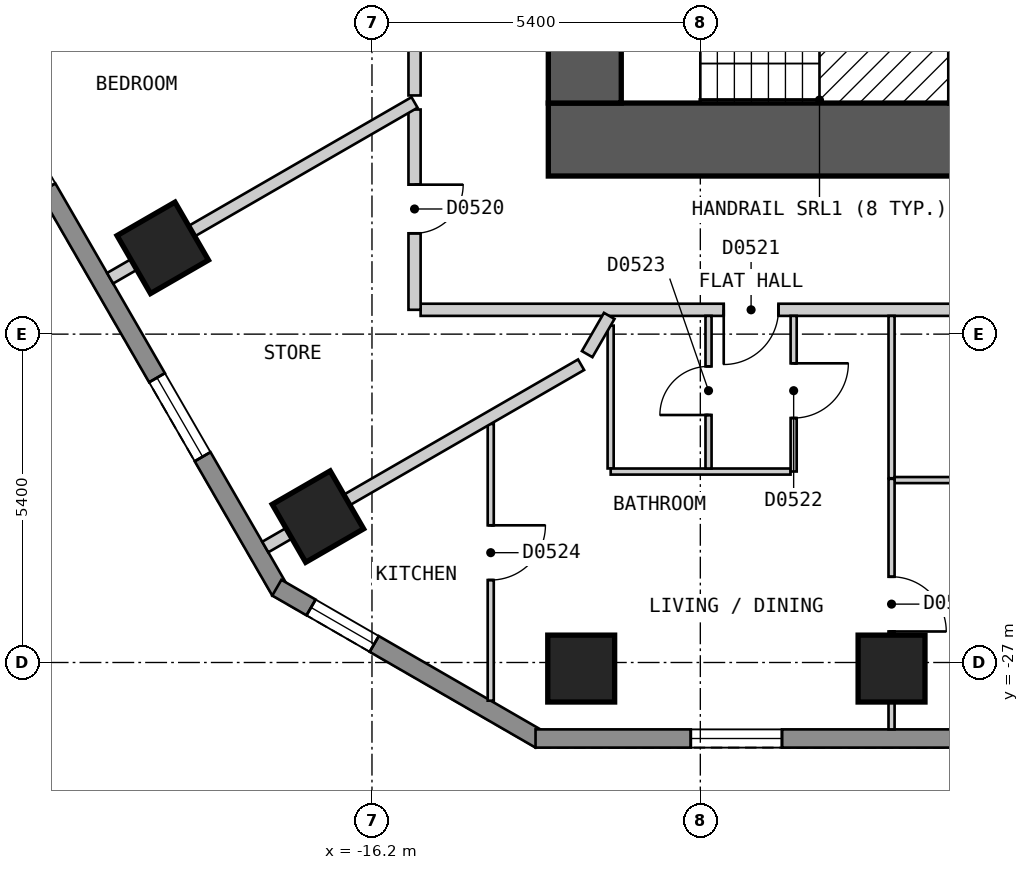
"""IFC4 building model, lengths in metres.
Left out: names, types, materials, properties, quantities, classifications, styles, units other than length and angle.
Written with IfcOpenShell. Run it as: python <this file> out.ifc"""

import sys

from ifc_helpers import new_model, si_unit, direction, frame, frame_2d, origin, origin_2d, place, context, subcontext, project, spatial, polyline, rectangle, outline, extrude, element, fill, save


model = new_model("IFC4")
c1 = context("Model", 3, precision=1e-05, world=origin(), true_north=direction((0.0, 1.0)))
c2 = subcontext(c1, "Body", "Model", "MODEL_VIEW")
j1 = project(units=[si_unit("LENGTHUNIT", "METRE"), si_unit("PLANEANGLEUNIT", "RADIAN")], contexts=[c1])
p1 = place(None, origin())
s1 = spatial("IfcSite", under=j1, at=p1, CompositionType="ELEMENT")
p2 = place(p1, origin())
s2 = spatial("IfcBuilding", under=s1, at=p2, CompositionType="ELEMENT")
p3 = place(p2, frame((0.0, 0.0, 50.4)))
s3 = spatial("IfcBuildingStorey", under=s2, at=p3, CompositionType="ELEMENT", Elevation=50.4)
for number, where, z_axis, x_axis in (
    (1, (-19.641, -20.181, 0.0), (0.0, 0.0, 1.0), (0.5, -0.866, 0.0)),
    (2, (-17.089, -24.601, 0.0), (0.0, 0.0, 1.0), (0.5, -0.866, 0.0)),
    (3, (-12.759, -27.1, 0.0), (0.0, 0.0, 1.0), (1.0, 0.0, 0.0)),
    (4, (-7.655, -27.1, 0.0), (0.0, 0.0, 1.0), (1.0, 0.0, 0.0)),
):
    element("IfcColumn", number, at=place(p3, frame(where, z_axis=z_axis, x_axis=x_axis)), inside=s3, PredefinedType="COLUMN", context=c2, shape_type="SweptSolid", body=[
        extrude(rectangle(XDim=1.1, YDim=1.1, at=origin_2d()), origin(), (0.0, 0.0, 1.0), 3.0),
    ])
p4 = place(p3, frame((-13.3, -18.4, 0.0), z_axis=(0.0, 0.0, 1.0), x_axis=(1.0, 0.0, 0.0)))
e5 = element("IfcWall", 5, at=p4, inside=s3, PredefinedType="SHEAR", context=c2, shape_type="SweptSolid", body=[
    extrude(rectangle(XDim=26.6, YDim=1.2, at=frame_2d((13.3, 0.0))), origin(), (0.0, 0.0, 1.0), 2.7),
])
p5 = place(p3, frame((-12.7, -17.8, 0.0), z_axis=(0.0, 0.0, 1.0), x_axis=(0.0, 1.0, 0.0)))
e6 = element("IfcWall", 6, at=p5, inside=s3, PredefinedType="SHEAR", context=c2, shape_type="SweptSolid", body=[
    extrude(rectangle(XDim=11.6, YDim=1.2, at=frame_2d((5.8, 0.0))), origin(), (0.0, 0.0, 1.0), 2.7),
])
p6 = place(p5, frame((3.6, 0.0, 0.0)))
e7 = element("IfcOpeningElement", 7, at=p6, cuts=e6, PredefinedType="OPENING", context=c2, shape_type="SweptSolid", body=[
    extrude(rectangle(XDim=1.2, YDim=2.1, at=frame_2d((0.6, 1.05))), frame((0.0, 0.61, 0.0), z_axis=(0.0, -1.0, 0.0), x_axis=(1.0, 0.0, 0.0)), (0.0, 0.0, 1.0), 1.22),
])
p7 = place(p3, frame((-31.22, -2.425, 0.0), z_axis=(0.0, 0.0, 1.0), x_axis=(0.500001938803, -0.866024284413, 0.0)))
e8 = element("IfcWall", 8, at=p7, inside=s3, PredefinedType="SOLIDWALL", context=c2, shape_type="SweptSolid", body=[
    extrude(outline(polyline([(0.0, -0.15), (27.02, -0.15), (26.94, 0.15), (0.08, 0.15), (0.0, -0.15)])), origin(), (0.0, 0.0, 1.0), 2.7),
])
p8 = place(p7, frame((2.553, 0.0, 0.15)))
e9 = element("IfcOpeningElement", 9, at=p8, cuts=e8, PredefinedType="OPENING", context=c2, shape_type="SweptSolid", body=[
    extrude(rectangle(XDim=1.5, YDim=2.1, at=frame_2d((0.75, 1.05))), frame((0.0, 0.16, 0.0), z_axis=(0.0, -1.0, 0.0), x_axis=(1.0, 0.0, 0.0)), (0.0, 0.0, 1.0), 0.32),
])
p9 = place(p7, frame((7.657, 0.0, 0.15)))
e10 = element("IfcOpeningElement", 10, at=p9, cuts=e8, PredefinedType="OPENING", context=c2, shape_type="SweptSolid", body=[
    extrude(rectangle(XDim=1.5, YDim=2.1, at=frame_2d((0.75, 1.05))), frame((0.0, 0.16, 0.0), z_axis=(0.0, -1.0, 0.0), x_axis=(1.0, 0.0, 0.0)), (0.0, 0.0, 1.0), 0.32),
])
p10 = place(p7, frame((12.761, 0.0, 0.15)))
e11 = element("IfcOpeningElement", 11, at=p10, cuts=e8, PredefinedType="OPENING", context=c2, shape_type="SweptSolid", body=[
    extrude(rectangle(XDim=1.5, YDim=2.1, at=frame_2d((0.75, 1.05))), frame((0.0, 0.16, 0.0), z_axis=(0.0, -1.0, 0.0), x_axis=(1.0, 0.0, 0.0)), (0.0, 0.0, 1.0), 0.32),
])
p11 = place(p7, frame((17.865, 0.0, 0.15)))
e12 = element("IfcOpeningElement", 12, at=p11, cuts=e8, PredefinedType="OPENING", context=c2, shape_type="SweptSolid", body=[
    extrude(rectangle(XDim=1.5, YDim=2.1, at=frame_2d((0.75, 1.05))), frame((0.0, 0.16, 0.0), z_axis=(0.0, -1.0, 0.0), x_axis=(1.0, 0.0, 0.0)), (0.0, 0.0, 1.0), 0.32),
])
p12 = place(p7, frame((22.969, 0.0, 0.15)))
e13 = element("IfcOpeningElement", 13, at=p12, cuts=e8, PredefinedType="OPENING", context=c2, shape_type="SweptSolid", body=[
    extrude(rectangle(XDim=1.5, YDim=2.1, at=frame_2d((0.75, 1.05))), frame((0.0, 0.16, 0.0), z_axis=(0.0, -1.0, 0.0), x_axis=(1.0, 0.0, 0.0)), (0.0, 0.0, 1.0), 0.32),
])
p13 = place(p3, frame((-17.765, -25.77, 0.0), z_axis=(0.0, 0.0, 1.0), x_axis=(0.866010750942, -0.50002537861, 0.0)))
e14 = element("IfcWall", 14, at=p13, inside=s3, PredefinedType="SOLIDWALL", context=c2, shape_type="SweptSolid", body=[
    extrude(outline(polyline([(0.0, -0.15), (5.0, -0.15), (4.919, 0.15), (0.08, 0.15), (0.0, -0.15)])), origin(), (0.0, 0.0, 1.0), 2.7),
])
p14 = place(p13, frame((0.65, 0.0, 0.15)))
e15 = element("IfcOpeningElement", 15, at=p14, cuts=e14, PredefinedType="OPENING", context=c2, shape_type="SweptSolid", body=[
    extrude(rectangle(XDim=1.2, YDim=2.1, at=frame_2d((0.6, 1.05))), frame((0.0, 0.16, 0.0), z_axis=(0.0, -1.0, 0.0), x_axis=(1.0, 0.0, 0.0)), (0.0, 0.0, 1.0), 0.32),
])
p15 = place(p3, frame((-13.51, -28.25, 0.0), z_axis=(0.0, 0.0, 1.0), x_axis=(1.0, 0.0, 0.0)))
e16 = element("IfcWall", 16, at=p15, inside=s3, PredefinedType="SOLIDWALL", context=c2, shape_type="SweptSolid", body=[
    extrude(outline(polyline([(0.0, -0.15), (27.02, -0.15), (26.94, 0.15), (0.08, 0.15), (0.0, -0.15)])), origin(), (0.0, 0.0, 1.0), 2.7),
])
p16 = place(p15, frame((2.553, 0.0, 0.15)))
e17 = element("IfcOpeningElement", 17, at=p16, cuts=e16, PredefinedType="OPENING", context=c2, shape_type="SweptSolid", body=[
    extrude(rectangle(XDim=1.5, YDim=2.1, at=frame_2d((0.75, 1.05))), frame((0.0, 0.16, 0.0), z_axis=(0.0, -1.0, 0.0), x_axis=(1.0, 0.0, 0.0)), (0.0, 0.0, 1.0), 0.32),
])
p17 = place(p15, frame((7.657, 0.0, 0.15)))
e18 = element("IfcOpeningElement", 18, at=p17, cuts=e16, PredefinedType="OPENING", context=c2, shape_type="SweptSolid", body=[
    extrude(rectangle(XDim=1.5, YDim=2.1, at=frame_2d((0.75, 1.05))), frame((0.0, 0.16, 0.0), z_axis=(0.0, -1.0, 0.0), x_axis=(1.0, 0.0, 0.0)), (0.0, 0.0, 1.0), 0.32),
])
p18 = place(p15, frame((12.761, 0.0, 0.15)))
e19 = element("IfcOpeningElement", 19, at=p18, cuts=e16, PredefinedType="OPENING", context=c2, shape_type="SweptSolid", body=[
    extrude(rectangle(XDim=1.5, YDim=2.1, at=frame_2d((0.75, 1.05))), frame((0.0, 0.16, 0.0), z_axis=(0.0, -1.0, 0.0), x_axis=(1.0, 0.0, 0.0)), (0.0, 0.0, 1.0), 0.32),
])
p19 = place(p15, frame((17.865, 0.0, 0.15)))
e20 = element("IfcOpeningElement", 20, at=p19, cuts=e16, PredefinedType="OPENING", context=c2, shape_type="SweptSolid", body=[
    extrude(rectangle(XDim=1.5, YDim=2.1, at=frame_2d((0.75, 1.05))), frame((0.0, 0.16, 0.0), z_axis=(0.0, -1.0, 0.0), x_axis=(1.0, 0.0, 0.0)), (0.0, 0.0, 1.0), 0.32),
])
p20 = place(p15, frame((22.969, 0.0, 0.15)))
e21 = element("IfcOpeningElement", 21, at=p20, cuts=e16, PredefinedType="OPENING", context=c2, shape_type="SweptSolid", body=[
    extrude(rectangle(XDim=1.5, YDim=2.1, at=frame_2d((0.75, 1.05))), frame((0.0, 0.16, 0.0), z_axis=(0.0, -1.0, 0.0), x_axis=(1.0, 0.0, 0.0)), (0.0, 0.0, 1.0), 0.32),
])
p21 = place(p3, frame((-15.5, -16.5, 0.0), z_axis=(0.0, 0.0, 1.0), x_axis=(0.0, -1.0, 0.0)))
e22 = element("IfcWall", 22, at=p21, inside=s3, PredefinedType="PARTITIONING", context=c2, shape_type="SweptSolid", body=[
    extrude(rectangle(XDim=1.175, YDim=0.2, at=frame_2d((0.587, 0.0))), origin(), (0.0, 0.0, 1.0), 2.7),
])
p22 = place(p3, frame((-15.4, -21.2, 0.0), z_axis=(0.0, 0.0, 1.0), x_axis=(1.0, 0.0, 0.0)))
e23 = element("IfcWall", 23, at=p22, inside=s3, PredefinedType="PARTITIONING", context=c2, shape_type="SweptSolid", body=[
    extrude(rectangle(XDim=30.799, YDim=0.2, at=frame_2d((15.399, 0.0))), origin(), (0.0, 0.0, 1.0), 2.7),
])
p23 = place(p22, frame((4.985, 0.0, 0.0)))
e24 = element("IfcOpeningElement", 24, at=p23, cuts=e23, PredefinedType="OPENING", context=c2, shape_type="SweptSolid", body=[
    extrude(rectangle(XDim=0.9, YDim=2.1, at=frame_2d((0.45, 1.05))), frame((0.0, 0.11, 0.0), z_axis=(0.0, -1.0, 0.0), x_axis=(1.0, 0.0, 0.0)), (0.0, 0.0, 1.0), 0.22),
])
p24 = place(p22, frame((20.005, 0.0, 0.0)))
e25 = element("IfcOpeningElement", 25, at=p24, cuts=e23, PredefinedType="OPENING", context=c2, shape_type="SweptSolid", body=[
    extrude(rectangle(XDim=1.0, YDim=2.1, at=frame_2d((0.5, 1.05))), frame((0.0, 0.11, 0.0), z_axis=(0.0, -1.0, 0.0), x_axis=(1.0, 0.0, 0.0)), (0.0, 0.0, 1.0), 0.22),
])
p25 = place(p22, frame((24.916, 0.0, 0.0)))
e26 = element("IfcOpeningElement", 26, at=p25, cuts=e23, PredefinedType="OPENING", context=c2, shape_type="SweptSolid", body=[
    extrude(rectangle(XDim=0.9, YDim=2.1, at=frame_2d((0.45, 1.05))), frame((0.0, 0.11, 0.0), z_axis=(0.0, -1.0, 0.0), x_axis=(1.0, 0.0, 0.0)), (0.0, 0.0, 1.0), 0.22),
])
p26 = place(p3, frame((-15.5, -21.2, 0.0), z_axis=(0.0, 0.0, 1.0), x_axis=(0.0, 1.0, 0.0)))
e27 = element("IfcWall", 27, at=p26, inside=s3, PredefinedType="PARTITIONING", context=c2, shape_type="SweptSolid", body=[
    extrude(rectangle(XDim=3.294, YDim=0.2, at=frame_2d((1.647, 0.0))), origin(), (0.0, 0.0, 1.0), 2.7),
])
p27 = place(p26, frame((1.258, 0.0, 0.0)))
e28 = element("IfcOpeningElement", 28, at=p27, cuts=e27, PredefinedType="OPENING", context=c2, shape_type="SweptSolid", body=[
    extrude(rectangle(XDim=0.8, YDim=2.1, at=frame_2d((0.4, 1.05))), frame((0.0, 0.11, 0.0), z_axis=(0.0, -1.0, 0.0), x_axis=(1.0, 0.0, 0.0)), (0.0, 0.0, 1.0), 0.22),
])
p28 = place(p3, frame((-7.655, -21.3, 0.0), z_axis=(0.0, 0.0, 1.0), x_axis=(0.0, -1.0, 0.0)))
e29 = element("IfcWall", 29, at=p28, inside=s3, PredefinedType="PARTITIONING", context=c2, shape_type="SweptSolid", body=[
    extrude(rectangle(XDim=2.67, YDim=0.1, at=frame_2d((1.335, 0.0))), origin(), (0.0, 0.0, 1.0), 2.7),
])
p29 = place(p3, frame((-12.275, -21.46, 0.0), z_axis=(0.0, 0.0, 1.0), x_axis=(0.0, -1.0, 0.0)))
e30 = element("IfcWall", 30, at=p29, inside=s3, PredefinedType="PARTITIONING", context=c2, shape_type="SweptSolid", body=[
    extrude(rectangle(XDim=2.349, YDim=0.1, at=frame_2d((1.175, 0.0))), origin(), (0.0, 0.0, 1.0), 2.7),
])
p30 = place(p3, frame((-12.274, -23.86, 0.0), z_axis=(0.0, 0.0, 1.0), x_axis=(1.0, 0.0, 0.0)))
e31 = element("IfcWall", 31, at=p30, inside=s3, PredefinedType="PARTITIONING", context=c2, shape_type="SweptSolid", body=[
    extrude(rectangle(XDim=2.958, YDim=0.1, at=frame_2d((1.479, 0.0))), origin(), (0.0, 0.0, 1.0), 2.7),
])
p31 = place(p3, frame((-7.605, -24.0, 0.0), z_axis=(0.0, 0.0, 1.0), x_axis=(1.0, 0.0, 0.0)))
e32 = element("IfcWall", 32, at=p31, inside=s3, PredefinedType="PARTITIONING", context=c2, shape_type="SweptSolid", body=[
    extrude(rectangle(XDim=5.054, YDim=0.1, at=frame_2d((2.527, 0.0))), origin(), (0.0, 0.0, 1.0), 2.7),
])
p32 = place(p31, frame((2.102, 0.0, 0.0)))
e33 = element("IfcOpeningElement", 33, at=p32, cuts=e32, PredefinedType="OPENING", context=c2, shape_type="SweptSolid", body=[
    extrude(rectangle(XDim=0.8, YDim=2.1, at=frame_2d((0.4, 1.05))), frame((0.0, 0.06, 0.0), z_axis=(0.0, -1.0, 0.0), x_axis=(1.0, 0.0, 0.0)), (0.0, 0.0, 1.0), 0.12),
])
p33 = place(p3, frame((-7.655, -28.1, 0.0), z_axis=(0.0, 0.0, 1.0), x_axis=(0.0, 1.0, 0.0)))
e34 = element("IfcWall", 34, at=p33, inside=s3, PredefinedType="PARTITIONING", context=c2, shape_type="SweptSolid", body=[
    extrude(rectangle(XDim=4.12, YDim=0.1, at=frame_2d((2.06, 0.0))), origin(), (0.0, 0.0, 1.0), 2.7),
])
p34 = place(p33, frame((1.61, 0.0, 0.0)))
e35 = element("IfcOpeningElement", 35, at=p34, cuts=e34, PredefinedType="OPENING", context=c2, shape_type="SweptSolid", body=[
    extrude(rectangle(XDim=0.9, YDim=2.1, at=frame_2d((0.45, 1.05))), frame((0.0, 0.06, 0.0), z_axis=(0.0, -1.0, 0.0), x_axis=(1.0, 0.0, 0.0)), (0.0, 0.0, 1.0), 0.12),
])
p35 = place(p3, frame((-9.265, -23.859, 0.0), z_axis=(0.0, 0.0, 1.0), x_axis=(0.0, 1.0, 0.0)))
e36 = element("IfcWall", 36, at=p35, inside=s3, PredefinedType="PARTITIONING", context=c2, shape_type="SweptSolid", body=[
    extrude(rectangle(XDim=2.559, YDim=0.1, at=frame_2d((1.279, 0.0))), origin(), (0.0, 0.0, 1.0), 2.7),
])
p36 = place(p35, frame((0.879, 0.0, 0.0)))
e37 = element("IfcOpeningElement", 37, at=p36, cuts=e36, PredefinedType="OPENING", context=c2, shape_type="SweptSolid", body=[
    extrude(rectangle(XDim=0.9, YDim=2.1, at=frame_2d((0.45, 1.05))), frame((0.0, 0.06, 0.0), z_axis=(0.0, -1.0, 0.0), x_axis=(1.0, 0.0, 0.0)), (0.0, 0.0, 1.0), 0.12),
])
p37 = place(p3, frame((-10.665, -23.81, 0.0), z_axis=(0.0, 0.0, 1.0), x_axis=(0.0, 1.0, 0.0)))
e38 = element("IfcWall", 38, at=p37, inside=s3, PredefinedType="PARTITIONING", context=c2, shape_type="SweptSolid", body=[
    extrude(rectangle(XDim=2.51, YDim=0.1, at=frame_2d((1.255, 0.0))), origin(), (0.0, 0.0, 1.0), 2.7),
])
p38 = place(p37, frame((0.88, 0.0, 0.0)))
e39 = element("IfcOpeningElement", 39, at=p38, cuts=e38, PredefinedType="OPENING", context=c2, shape_type="SweptSolid", body=[
    extrude(rectangle(XDim=0.8, YDim=2.1, at=frame_2d((0.4, 1.05))), frame((0.0, 0.06, 0.0), z_axis=(0.0, -1.0, 0.0), x_axis=(1.0, 0.0, 0.0)), (0.0, 0.0, 1.0), 0.12),
])
p39 = place(p3, frame((-14.247, -27.628, 0.0), z_axis=(0.0, 0.0, 1.0), x_axis=(0.0, 1.0, 0.0)))
e40 = element("IfcWall", 40, at=p39, inside=s3, PredefinedType="PARTITIONING", context=c2, shape_type="SweptSolid", body=[
    extrude(rectangle(XDim=4.552, YDim=0.1, at=frame_2d((2.276, 0.0))), origin(), (0.0, 0.0, 1.0), 2.7),
])
p40 = place(p39, frame((1.984, 0.0, 0.0)))
e41 = element("IfcOpeningElement", 41, at=p40, cuts=e40, PredefinedType="OPENING", context=c2, shape_type="SweptSolid", body=[
    extrude(rectangle(XDim=0.9, YDim=2.1, at=frame_2d((0.45, 1.05))), frame((0.0, 0.06, 0.0), z_axis=(0.0, -1.0, 0.0), x_axis=(1.0, 0.0, 0.0)), (0.0, 0.0, 1.0), 0.12),
])
p41 = place(p3, frame((-12.661, -21.929, 0.0), z_axis=(0.0, 0.0, 1.0), x_axis=(0.499683639304, 0.866207977689, 0.0)))
e42 = element("IfcWall", 42, at=p41, inside=s3, PredefinedType="PARTITIONING", context=c2, shape_type="SweptSolid", body=[
    extrude(rectangle(XDim=0.726, YDim=0.2, at=frame_2d((0.363, 0.0))), origin(), (0.0, 0.0, 1.0), 2.7),
])
p42 = place(p3, frame((-20.507, -20.681, 0.0), z_axis=(0.0, 0.0, 1.0), x_axis=(0.86602314875, 0.500003905814, 0.0)))
e43 = element("IfcWall", 43, at=p42, inside=s3, PredefinedType="PARTITIONING", context=c2, shape_type="SweptSolid", body=[
    extrude(rectangle(XDim=5.782, YDim=0.2, at=frame_2d((2.891, 0.0))), origin(), (0.0, 0.0, 1.0), 2.7),
])
p43 = place(p3, frame((-17.955, -25.101, 0.0), z_axis=(0.0, 0.0, 1.0), x_axis=(0.866080519133, 0.499904525262, 0.0)))
e44 = element("IfcWall", 44, at=p43, inside=s3, PredefinedType="PARTITIONING", context=c2, shape_type="SweptSolid", body=[
    extrude(rectangle(XDim=5.997, YDim=0.2, at=frame_2d((2.999, 0.0))), origin(), (0.0, 0.0, 1.0), 2.7),
])
p44 = place(p12, origin())
e45 = element("IfcWindow", 45, at=p44, inside=s3, PartitioningType="SINGLE_PANEL", PredefinedType="WINDOW", context=c2, shape_type="SweptSolid", body=[
    extrude(rectangle(XDim=1.5, YDim=2.1, at=frame_2d((0.75, 1.05))), frame((0.0, 0.03, 0.0), z_axis=(0.0, -1.0, 0.0), x_axis=(1.0, 0.0, 0.0)), (0.0, 0.0, 1.0), 0.06),
])
fill(e13, e45)
p45 = place(p14, origin())
e46 = element("IfcWindow", 46, at=p45, inside=s3, PartitioningType="SINGLE_PANEL", PredefinedType="WINDOW", context=c2, shape_type="SweptSolid", body=[
    extrude(rectangle(XDim=1.2, YDim=2.1, at=frame_2d((0.6, 1.05))), frame((0.0, 0.03, 0.0), z_axis=(0.0, -1.0, 0.0), x_axis=(1.0, 0.0, 0.0)), (0.0, 0.0, 1.0), 0.06),
])
fill(e15, e46)
p46 = place(p16, origin())
e47 = element("IfcWindow", 47, at=p46, inside=s3, PartitioningType="SINGLE_PANEL", PredefinedType="WINDOW", context=c2, shape_type="SweptSolid", body=[
    extrude(rectangle(XDim=1.5, YDim=2.1, at=frame_2d((0.75, 1.05))), frame((0.0, 0.03, 0.0), z_axis=(0.0, -1.0, 0.0), x_axis=(1.0, 0.0, 0.0)), (0.0, 0.0, 1.0), 0.06),
])
fill(e17, e47)
p47 = place(p27, origin())
e48 = element("IfcDoor", 48, at=p47, inside=s3, OperationType="SINGLE_SWING_RIGHT", PredefinedType="DOOR", context=c2, shape_type="SweptSolid", body=[
    extrude(rectangle(XDim=0.8, YDim=2.1, at=frame_2d((0.4, 1.05))), frame((0.0, 0.025, 0.0), z_axis=(0.0, -1.0, 0.0), x_axis=(1.0, 0.0, 0.0)), (0.0, 0.0, 1.0), 0.05),
])
fill(e28, e48)
p48 = place(p23, origin())
e49 = element("IfcDoor", 49, at=p48, inside=s3, OperationType="SINGLE_SWING_LEFT", PredefinedType="DOOR", context=c2, shape_type="SweptSolid", body=[
    extrude(rectangle(XDim=0.9, YDim=2.1, at=frame_2d((0.45, 1.05))), frame((0.0, 0.025, 0.0), z_axis=(0.0, -1.0, 0.0), x_axis=(1.0, 0.0, 0.0)), (0.0, 0.0, 1.0), 0.05),
])
fill(e24, e49)
p49 = place(p36, origin())
e50 = element("IfcDoor", 50, at=p49, inside=s3, OperationType="SINGLE_SWING_RIGHT", PredefinedType="DOOR", context=c2, shape_type="SweptSolid", body=[
    extrude(rectangle(XDim=0.9, YDim=2.1, at=frame_2d((0.45, 1.05))), frame((0.0, 0.025, 0.0), z_axis=(0.0, -1.0, 0.0), x_axis=(1.0, 0.0, 0.0)), (0.0, 0.0, 1.0), 0.05),
])
fill(e37, e50)
p50 = place(p38, origin())
e51 = element("IfcDoor", 51, at=p50, inside=s3, OperationType="SINGLE_SWING_LEFT", PredefinedType="DOOR", context=c2, shape_type="SweptSolid", body=[
    extrude(rectangle(XDim=0.8, YDim=2.1, at=frame_2d((0.4, 1.05))), frame((0.0, 0.025, 0.0), z_axis=(0.0, -1.0, 0.0), x_axis=(1.0, 0.0, 0.0)), (0.0, 0.0, 1.0), 0.05),
])
fill(e39, e51)
p51 = place(p40, origin())
e52 = element("IfcDoor", 52, at=p51, inside=s3, OperationType="SINGLE_SWING_RIGHT", PredefinedType="DOOR", context=c2, shape_type="SweptSolid", body=[
    extrude(rectangle(XDim=0.9, YDim=2.1, at=frame_2d((0.45, 1.05))), frame((0.0, 0.025, 0.0), z_axis=(0.0, -1.0, 0.0), x_axis=(1.0, 0.0, 0.0)), (0.0, 0.0, 1.0), 0.05),
])
fill(e41, e52)
p52 = place(p34, origin())
e53 = element("IfcDoor", 53, at=p52, inside=s3, OperationType="SINGLE_SWING_LEFT", PredefinedType="DOOR", context=c2, shape_type="SweptSolid", body=[
    extrude(rectangle(XDim=0.9, YDim=2.1, at=frame_2d((0.45, 1.05))), frame((0.0, 0.025, 0.0), z_axis=(0.0, -1.0, 0.0), x_axis=(1.0, 0.0, 0.0)), (0.0, 0.0, 1.0), 0.05),
])
fill(e35, e53)
save(model, sys.argv[1])
